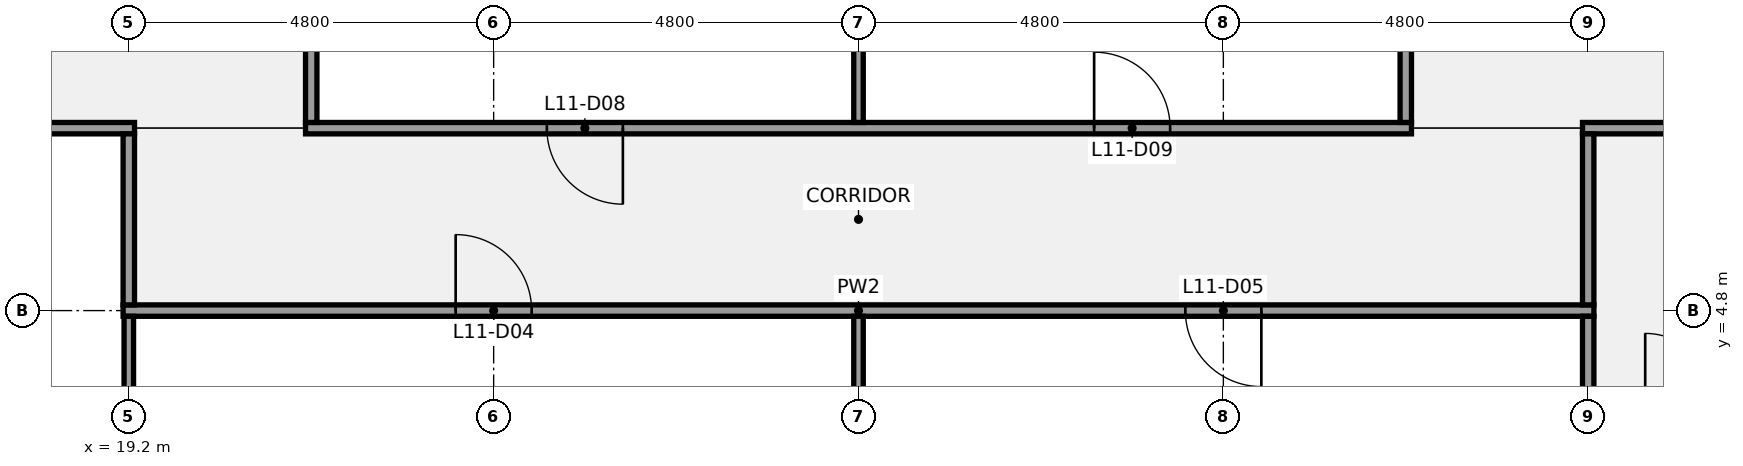
"""IFC4 building model, lengths in metres.
Left out: names, types, materials, properties, quantities, classifications, styles, units other than length and angle.
Written with IfcOpenShell. Run it as: python <this file> out.ifc"""

import sys

from ifc_helpers import new_model, si_unit, direction, frame, frame_2d, origin, place, context, subcontext, project, spatial, rectangle, extrude, element, fill, save


model = new_model("IFC4")
c1 = context("Model", 3, precision=1e-05, world=origin(), true_north=direction((0.0, 1.0)))
c2 = subcontext(c1, "Body", "Model", "MODEL_VIEW")
j1 = project(units=[si_unit("LENGTHUNIT", "METRE"), si_unit("PLANEANGLEUNIT", "RADIAN")], contexts=[c1])
p1 = place(None, origin())
s1 = spatial("IfcSite", under=j1, at=p1, CompositionType="ELEMENT")
p2 = place(p1, origin())
s2 = spatial("IfcBuilding", under=s1, at=p2, CompositionType="ELEMENT")
p3 = place(p2, frame((0.0, 0.0, 55.0)))
s3 = spatial("IfcBuildingStorey", under=s2, at=p3, CompositionType="ELEMENT", Elevation=55.0)
p4 = place(p3, frame((19.125, 4.8, 0.0), z_axis=(0.0, 0.0, 1.0), x_axis=(1.0, 0.0, 0.0)))
e1 = element("IfcWall", 1, at=p4, inside=s3, PredefinedType="PARTITIONING", context=c2, shape_type="SweptSolid", body=[
    extrude(rectangle(XDim=19.35, YDim=0.15, at=frame_2d((9.675, 0.0))), origin(), (0.0, 0.0, 1.0), 2.849),
])
p5 = place(p4, frame((4.375, 0.0, 0.0)))
e2 = element("IfcOpeningElement", 2, at=p5, cuts=e1, PredefinedType="OPENING", context=c2, shape_type="SweptSolid", body=[
    extrude(rectangle(XDim=1.0, YDim=2.1, at=frame_2d((0.5, 1.05))), frame((0.0, 0.085, 0.0), z_axis=(0.0, -1.0, 0.0), x_axis=(1.0, 0.0, 0.0)), (0.0, 0.0, 1.0), 0.17),
])
p6 = place(p4, frame((13.975, 0.0, 0.0)))
e3 = element("IfcOpeningElement", 3, at=p6, cuts=e1, PredefinedType="OPENING", context=c2, shape_type="SweptSolid", body=[
    extrude(rectangle(XDim=1.0, YDim=2.1, at=frame_2d((0.5, 1.05))), frame((0.0, 0.085, 0.0), z_axis=(0.0, -1.0, 0.0), x_axis=(1.0, 0.0, 0.0)), (0.0, 0.0, 1.0), 0.17),
])
p7 = place(p3, frame((9.525, 7.2, 0.0), z_axis=(0.0, 0.0, 1.0), x_axis=(1.0, 0.0, 0.0)))
e4 = element("IfcWall", 4, at=p7, inside=s3, PredefinedType="PARTITIONING", context=c2, shape_type="SweptSolid", body=[
    extrude(rectangle(XDim=9.75, YDim=0.15, at=frame_2d((4.875, 0.0))), origin(), (0.0, 0.0, 1.0), 2.849),
])
p8 = place(p7, frame((1.975, 0.0, 0.0)))
e5 = element("IfcOpeningElement", 5, at=p8, cuts=e4, PredefinedType="OPENING", context=c2, shape_type="SweptSolid", body=[
    extrude(rectangle(XDim=1.0, YDim=2.1, at=frame_2d((0.5, 1.05))), frame((0.0, 0.085, 0.0), z_axis=(0.0, -1.0, 0.0), x_axis=(1.0, 0.0, 0.0)), (0.0, 0.0, 1.0), 0.17),
])
p9 = place(p7, frame((6.775, 0.0, 0.0)))
e6 = element("IfcOpeningElement", 6, at=p9, cuts=e4, PredefinedType="OPENING", context=c2, shape_type="SweptSolid", body=[
    extrude(rectangle(XDim=1.0, YDim=2.1, at=frame_2d((0.5, 1.05))), frame((0.0, 0.085, 0.0), z_axis=(0.0, -1.0, 0.0), x_axis=(1.0, 0.0, 0.0)), (0.0, 0.0, 1.0), 0.17),
])
p10 = place(p3, frame((21.525, 7.2, 0.0), z_axis=(0.0, 0.0, 1.0), x_axis=(1.0, 0.0, 0.0)))
e7 = element("IfcWall", 7, at=p10, inside=s3, PredefinedType="PARTITIONING", context=c2, shape_type="SweptSolid", body=[
    extrude(rectangle(XDim=14.55, YDim=0.15, at=frame_2d((7.275, 0.0))), origin(), (0.0, 0.0, 1.0), 2.849),
])
p11 = place(p10, frame((3.175, 0.0, 0.0)))
e8 = element("IfcOpeningElement", 8, at=p11, cuts=e7, PredefinedType="OPENING", context=c2, shape_type="SweptSolid", body=[
    extrude(rectangle(XDim=1.0, YDim=2.1, at=frame_2d((0.5, 1.05))), frame((0.0, 0.085, 0.0), z_axis=(0.0, -1.0, 0.0), x_axis=(1.0, 0.0, 0.0)), (0.0, 0.0, 1.0), 0.17),
])
p12 = place(p10, frame((10.375, 0.0, 0.0)))
e9 = element("IfcOpeningElement", 9, at=p12, cuts=e7, PredefinedType="OPENING", context=c2, shape_type="SweptSolid", body=[
    extrude(rectangle(XDim=1.0, YDim=2.1, at=frame_2d((0.5, 1.05))), frame((0.0, 0.085, 0.0), z_axis=(0.0, -1.0, 0.0), x_axis=(1.0, 0.0, 0.0)), (0.0, 0.0, 1.0), 0.17),
])
p13 = place(p3, frame((38.325, 7.2, 0.0), z_axis=(0.0, 0.0, 1.0), x_axis=(1.0, 0.0, 0.0)))
e10 = element("IfcWall", 10, at=p13, inside=s3, PredefinedType="PARTITIONING", context=c2, shape_type="SweptSolid", body=[
    extrude(rectangle(XDim=9.75, YDim=0.15, at=frame_2d((4.875, 0.0))), origin(), (0.0, 0.0, 1.0), 2.849),
])
p14 = place(p13, frame((3.175, 0.0, 0.0)))
e11 = element("IfcOpeningElement", 11, at=p14, cuts=e10, PredefinedType="OPENING", context=c2, shape_type="SweptSolid", body=[
    extrude(rectangle(XDim=1.0, YDim=2.1, at=frame_2d((0.5, 1.05))), frame((0.0, 0.085, 0.0), z_axis=(0.0, -1.0, 0.0), x_axis=(1.0, 0.0, 0.0)), (0.0, 0.0, 1.0), 0.17),
])
p15 = place(p13, frame((7.975, 0.0, 0.0)))
e12 = element("IfcOpeningElement", 12, at=p15, cuts=e10, PredefinedType="OPENING", context=c2, shape_type="SweptSolid", body=[
    extrude(rectangle(XDim=1.0, YDim=2.1, at=frame_2d((0.5, 1.05))), frame((0.0, 0.085, 0.0), z_axis=(0.0, -1.0, 0.0), x_axis=(1.0, 0.0, 0.0)), (0.0, 0.0, 1.0), 0.17),
])
p16 = place(p3, frame((19.2, 0.65, 0.0), z_axis=(0.0, 0.0, 1.0), x_axis=(0.0, 1.0, 0.0)))
e13 = element("IfcWall", 13, at=p16, inside=s3, PredefinedType="PARTITIONING", context=c2, shape_type="SweptSolid", body=[
    extrude(rectangle(XDim=4.075, YDim=0.125, at=frame_2d((2.038, 0.0))), origin(), (0.0, 0.0, 1.0), 2.849),
])
p17 = place(p3, frame((19.2, 4.875, 0.0), z_axis=(0.0, 0.0, 1.0), x_axis=(0.0, 1.0, 0.0)))
e14 = element("IfcWall", 14, at=p17, inside=s3, PredefinedType="PARTITIONING", context=c2, shape_type="SweptSolid", body=[
    extrude(rectangle(XDim=2.25, YDim=0.15, at=frame_2d((1.125, 0.0))), origin(), (0.0, 0.0, 1.0), 2.849),
])
p18 = place(p3, frame((21.6, 7.275, 0.0), z_axis=(0.0, 0.0, 1.0), x_axis=(0.0, 1.0, 0.0)))
e15 = element("IfcWall", 15, at=p18, inside=s3, PredefinedType="PARTITIONING", context=c2, shape_type="SweptSolid", body=[
    extrude(rectangle(XDim=3.463, YDim=0.15, at=frame_2d((1.731, 0.0))), origin(), (0.0, 0.0, 1.0), 2.849),
])
p19 = place(p3, frame((28.8, 0.65, 0.0), z_axis=(0.0, 0.0, 1.0), x_axis=(0.0, 1.0, 0.0)))
e16 = element("IfcWall", 16, at=p19, inside=s3, PredefinedType="PARTITIONING", context=c2, shape_type="SweptSolid", body=[
    extrude(rectangle(XDim=4.075, YDim=0.125, at=frame_2d((2.038, 0.0))), origin(), (0.0, 0.0, 1.0), 2.849),
])
p20 = place(p3, frame((28.8, 7.275, 0.0), z_axis=(0.0, 0.0, 1.0), x_axis=(0.0, 1.0, 0.0)))
e17 = element("IfcWall", 17, at=p20, inside=s3, PredefinedType="PARTITIONING", context=c2, shape_type="SweptSolid", body=[
    extrude(rectangle(XDim=3.463, YDim=0.125, at=frame_2d((1.731, 0.0))), origin(), (0.0, 0.0, 1.0), 2.849),
])
p21 = place(p3, frame((36.0, 7.275, 0.0), z_axis=(0.0, 0.0, 1.0), x_axis=(0.0, 1.0, 0.0)))
e18 = element("IfcWall", 18, at=p21, inside=s3, PredefinedType="PARTITIONING", context=c2, shape_type="SweptSolid", body=[
    extrude(rectangle(XDim=3.463, YDim=0.15, at=frame_2d((1.731, 0.0))), origin(), (0.0, 0.0, 1.0), 2.849),
])
p22 = place(p3, frame((38.4, 3.675, 0.0), z_axis=(0.0, 0.0, 1.0), x_axis=(0.0, 1.0, 0.0)))
e19 = element("IfcWall", 19, at=p22, inside=s3, PredefinedType="PARTITIONING", context=c2, shape_type="SweptSolid", body=[
    extrude(rectangle(XDim=1.05, YDim=0.15, at=frame_2d((0.525, 0.0))), origin(), (0.0, 0.0, 1.0), 2.849),
])
p23 = place(p3, frame((38.4, 4.875, 0.0), z_axis=(0.0, 0.0, 1.0), x_axis=(0.0, 1.0, 0.0)))
e20 = element("IfcWall", 20, at=p23, inside=s3, PredefinedType="PARTITIONING", context=c2, shape_type="SweptSolid", body=[
    extrude(rectangle(XDim=2.25, YDim=0.15, at=frame_2d((1.125, 0.0))), origin(), (0.0, 0.0, 1.0), 2.849),
])
p24 = place(p5, origin())
e21 = element("IfcDoor", 21, at=p24, inside=s3, OperationType="SINGLE_SWING_LEFT", PredefinedType="DOOR", context=c2, shape_type="SweptSolid", body=[
    extrude(rectangle(XDim=1.0, YDim=2.1, at=frame_2d((0.5, 1.05))), frame((0.0, 0.025, 0.0), z_axis=(0.0, -1.0, 0.0), x_axis=(1.0, 0.0, 0.0)), (0.0, 0.0, 1.0), 0.05),
])
fill(e2, e21)
p25 = place(p6, origin())
e22 = element("IfcDoor", 22, at=p25, inside=s3, OperationType="SINGLE_SWING_RIGHT", PredefinedType="DOOR", context=c2, shape_type="SweptSolid", body=[
    extrude(rectangle(XDim=1.0, YDim=2.1, at=frame_2d((0.5, 1.05))), frame((0.0, 0.025, 0.0), z_axis=(0.0, -1.0, 0.0), x_axis=(1.0, 0.0, 0.0)), (0.0, 0.0, 1.0), 0.05),
])
fill(e3, e22)
p26 = place(p11, origin())
e23 = element("IfcDoor", 23, at=p26, inside=s3, OperationType="SINGLE_SWING_RIGHT", PredefinedType="DOOR", context=c2, shape_type="SweptSolid", body=[
    extrude(rectangle(XDim=1.0, YDim=2.1, at=frame_2d((0.5, 1.05))), frame((0.0, 0.025, 0.0), z_axis=(0.0, -1.0, 0.0), x_axis=(1.0, 0.0, 0.0)), (0.0, 0.0, 1.0), 0.05),
])
fill(e8, e23)
p27 = place(p12, origin())
e24 = element("IfcDoor", 24, at=p27, inside=s3, OperationType="SINGLE_SWING_LEFT", PredefinedType="DOOR", context=c2, shape_type="SweptSolid", body=[
    extrude(rectangle(XDim=1.0, YDim=2.1, at=frame_2d((0.5, 1.05))), frame((0.0, 0.025, 0.0), z_axis=(0.0, -1.0, 0.0), x_axis=(1.0, 0.0, 0.0)), (0.0, 0.0, 1.0), 0.05),
])
fill(e9, e24)
save(model, sys.argv[1])
